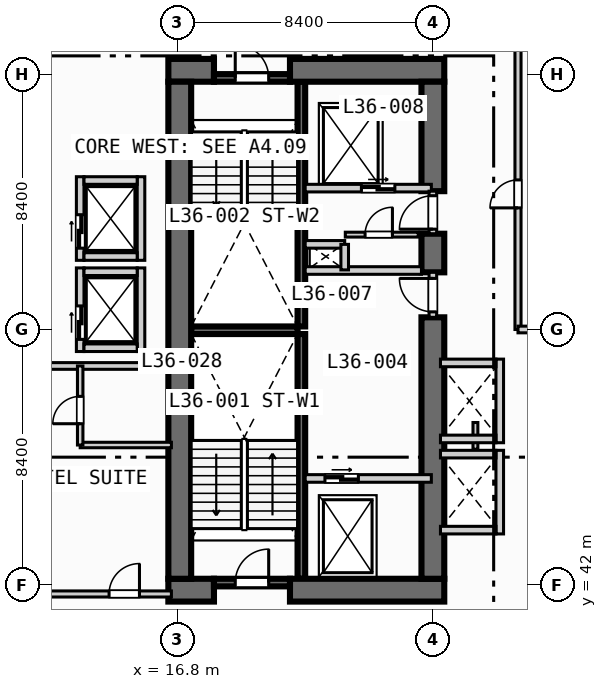
"""IFC4 building model, lengths in metres.
Left out: names, types, materials, properties, quantities, classifications, styles, units other than length and angle.
Written with IfcOpenShell. Run it as: python <this file> out.ifc"""

import sys

from ifc_helpers import new_model, si_unit, direction, frame, frame_2d, origin, place, context, subcontext, project, spatial, rectangle, extrude, element, fill, save


model = new_model("IFC4")
c1 = context("Model", 3, precision=1e-05, world=origin(), true_north=direction((0.0, 1.0)))
c2 = subcontext(c1, "Body", "Model", "MODEL_VIEW")
j1 = project(units=[si_unit("LENGTHUNIT", "METRE"), si_unit("PLANEANGLEUNIT", "RADIAN")], contexts=[c1])
p1 = place(None, origin())
s1 = spatial("IfcSite", under=j1, at=p1, CompositionType="ELEMENT")
p2 = place(p1, origin())
s2 = spatial("IfcBuilding", under=s1, at=p2, CompositionType="ELEMENT")
p3 = place(p2, frame((0.0, 0.0, 149.4)))
s3 = spatial("IfcBuildingStorey", under=s2, at=p3, CompositionType="ELEMENT", Elevation=149.4)
for number, where, z_axis, x_axis in (
    (1, (20.875, 42.2, 0.0), (0.0, 0.0, 1.0), (0.0, 1.0, 0.0)),
    (2, (20.875, 50.5, 0.0), (0.0, 0.0, 1.0), (0.0, 1.0, 0.0)),
):
    element("IfcWall", number, at=place(p3, frame(where, z_axis=z_axis, x_axis=x_axis)), inside=s3, PredefinedType="SOLIDWALL", context=c2, shape_type="SweptSolid", body=[
        extrude(rectangle(XDim=8.05, YDim=0.25, at=frame_2d((4.025, 0.0))), origin(), (0.0, 0.0, 1.0), 3.55),
    ])
p4 = place(p3, frame((17.25, 50.375, 0.0), z_axis=(0.0, 0.0, 1.0), x_axis=(1.0, 0.0, 0.0)))
e3 = element("IfcWall", 3, at=p4, inside=s3, PredefinedType="SOLIDWALL", context=c2, shape_type="SweptSolid", body=[
    extrude(rectangle(XDim=3.5, YDim=0.25, at=frame_2d((1.75, 0.0))), origin(), (0.0, 0.0, 1.0), 3.55),
])
p5 = place(p3, frame((16.5, 41.825, 0.0), z_axis=(0.0, 0.0, 1.0), x_axis=(1.0, 0.0, 0.0)))
e4 = element("IfcWall", 4, at=p5, inside=s3, PredefinedType="SHEAR", context=c2, shape_type="SweptSolid", body=[
    extrude(rectangle(XDim=1.5, YDim=0.75, at=frame_2d((0.75, 0.0))), origin(), (0.0, 0.0, 1.0), 3.55),
])
p6 = place(p3, frame((20.5, 41.825, 0.0), z_axis=(0.0, 0.0, 1.0), x_axis=(1.0, 0.0, 0.0)))
e5 = element("IfcWall", 5, at=p6, inside=s3, PredefinedType="SHEAR", context=c2, shape_type="SweptSolid", body=[
    extrude(rectangle(XDim=5.075, YDim=0.75, at=frame_2d((2.538, 0.0))), origin(), (0.0, 0.0, 1.0), 3.55),
])
p7 = place(p3, frame((16.5, 58.925, 0.0), z_axis=(0.0, 0.0, 1.0), x_axis=(1.0, 0.0, 0.0)))
e6 = element("IfcWall", 6, at=p7, inside=s3, PredefinedType="SHEAR", context=c2, shape_type="SweptSolid", body=[
    extrude(rectangle(XDim=1.5, YDim=0.75, at=frame_2d((0.75, 0.0))), origin(), (0.0, 0.0, 1.0), 3.55),
])
p8 = place(p3, frame((20.5, 58.925, 0.0), z_axis=(0.0, 0.0, 1.0), x_axis=(1.0, 0.0, 0.0)))
e7 = element("IfcWall", 7, at=p8, inside=s3, PredefinedType="SHEAR", context=c2, shape_type="SweptSolid", body=[
    extrude(rectangle(XDim=5.075, YDim=0.75, at=frame_2d((2.538, 0.0))), origin(), (0.0, 0.0, 1.0), 3.55),
])
p9 = place(p3, frame((16.875, 42.2, 0.0), z_axis=(0.0, 0.0, 1.0), x_axis=(0.0, 1.0, 0.0)))
e8 = element("IfcWall", 8, at=p9, inside=s3, PredefinedType="SHEAR", context=c2, shape_type="SweptSolid", body=[
    extrude(rectangle(XDim=16.35, YDim=0.75, at=frame_2d((8.175, 0.0))), origin(), (0.0, 0.0, 1.0), 3.55),
])
p10 = place(p3, frame((25.2, 42.2, 0.0), z_axis=(0.0, 0.0, 1.0), x_axis=(0.0, 1.0, 0.0)))
e9 = element("IfcWall", 9, at=p10, inside=s3, PredefinedType="SHEAR", context=c2, shape_type="SweptSolid", body=[
    extrude(rectangle(XDim=8.6, YDim=0.75, at=frame_2d((4.3, 0.0))), origin(), (0.0, 0.0, 1.0), 3.55),
])
p11 = place(p3, frame((25.2, 52.28, 0.0), z_axis=(0.0, 0.0, 1.0), x_axis=(0.0, 1.0, 0.0)))
e10 = element("IfcWall", 10, at=p11, inside=s3, PredefinedType="SHEAR", context=c2, shape_type="SweptSolid", body=[
    extrude(rectangle(XDim=1.27, YDim=0.75, at=frame_2d((0.635, 0.0))), origin(), (0.0, 0.0, 1.0), 3.55),
])
p12 = place(p3, frame((25.2, 54.95, 0.0), z_axis=(0.0, 0.0, 1.0), x_axis=(0.0, 1.0, 0.0)))
e11 = element("IfcWall", 11, at=p12, inside=s3, PredefinedType="SHEAR", context=c2, shape_type="SweptSolid", body=[
    extrude(rectangle(XDim=3.6, YDim=0.75, at=frame_2d((1.8, 0.0))), origin(), (0.0, 0.0, 1.0), 3.55),
])
p13 = place(p3, frame((18.0, 42.075, 0.0), z_axis=(0.0, 0.0, 1.0), x_axis=(1.0, 0.0, 0.0)))
e12 = element("IfcWall", 12, at=p13, inside=s3, PredefinedType="SOLIDWALL", context=c2, shape_type="SweptSolid", body=[
    extrude(rectangle(XDim=2.5, YDim=0.25, at=frame_2d((1.25, 0.0))), origin(), (0.0, 0.0, 1.0), 3.55),
])
p14 = place(p13, frame((0.7, 0.0, 0.0)))
e13 = element("IfcOpeningElement", 13, at=p14, cuts=e12, PredefinedType="OPENING", context=c2, shape_type="SweptSolid", body=[
    extrude(rectangle(XDim=1.1, YDim=2.15, at=frame_2d((0.55, 1.075))), frame((0.0, 0.135, 0.0), z_axis=(0.0, -1.0, 0.0), x_axis=(1.0, 0.0, 0.0)), (0.0, 0.0, 1.0), 0.27),
])
p15 = place(p3, frame((18.0, 58.675, 0.0), z_axis=(0.0, 0.0, 1.0), x_axis=(1.0, 0.0, 0.0)))
e14 = element("IfcWall", 14, at=p15, inside=s3, PredefinedType="SOLIDWALL", context=c2, shape_type="SweptSolid", body=[
    extrude(rectangle(XDim=2.5, YDim=0.25, at=frame_2d((1.25, 0.0))), origin(), (0.0, 0.0, 1.0), 3.55),
])
p16 = place(p15, frame((0.7, 0.0, 0.0)))
e15 = element("IfcOpeningElement", 15, at=p16, cuts=e14, PredefinedType="OPENING", context=c2, shape_type="SweptSolid", body=[
    extrude(rectangle(XDim=1.1, YDim=2.15, at=frame_2d((0.55, 1.075))), frame((0.0, 0.135, 0.0), z_axis=(0.0, -1.0, 0.0), x_axis=(1.0, 0.0, 0.0)), (0.0, 0.0, 1.0), 0.27),
])
p17 = place(p3, frame((21.0, 45.5, 0.0), z_axis=(0.0, 0.0, 1.0), x_axis=(1.0, 0.0, 0.0)))
e16 = element("IfcWall", 16, at=p17, inside=s3, PredefinedType="SOLIDWALL", context=c2, shape_type="SweptSolid", body=[
    extrude(rectangle(XDim=4.15, YDim=0.25, at=frame_2d((2.075, 0.0))), origin(), (0.0, 0.0, 1.0), 3.55),
])
p18 = place(p17, frame((0.65, 0.0, 0.0)))
e17 = element("IfcOpeningElement", 17, at=p18, cuts=e16, PredefinedType="OPENING", context=c2, shape_type="SweptSolid", body=[
    extrude(rectangle(XDim=1.1, YDim=2.15, at=frame_2d((0.55, 1.075))), frame((0.0, 0.135, 0.0), z_axis=(0.0, -1.0, 0.0), x_axis=(1.0, 0.0, 0.0)), (0.0, 0.0, 1.0), 0.27),
])
p19 = place(p3, frame((25.2, 50.8, 0.0), z_axis=(0.0, 0.0, 1.0), x_axis=(0.0, 1.0, 0.0)))
e18 = element("IfcWall", 18, at=p19, inside=s3, PredefinedType="SOLIDWALL", context=c2, shape_type="SweptSolid", body=[
    extrude(rectangle(XDim=1.48, YDim=0.25, at=frame_2d((0.74, 0.0))), origin(), (0.0, 0.0, 1.0), 3.55),
])
p20 = place(p19, frame((0.18, 0.0, 0.0)))
e19 = element("IfcOpeningElement", 19, at=p20, cuts=e18, PredefinedType="OPENING", context=c2, shape_type="SweptSolid", body=[
    extrude(rectangle(XDim=1.1, YDim=2.15, at=frame_2d((0.55, 1.075))), frame((0.0, 0.135, 0.0), z_axis=(0.0, -1.0, 0.0), x_axis=(1.0, 0.0, 0.0)), (0.0, 0.0, 1.0), 0.27),
])
p21 = place(p3, frame((21.0, 52.34, 0.0), z_axis=(0.0, 0.0, 1.0), x_axis=(1.0, 0.0, 0.0)))
e20 = element("IfcWall", 20, at=p21, inside=s3, PredefinedType="SOLIDWALL", context=c2, shape_type="SweptSolid", body=[
    extrude(rectangle(XDim=3.825, YDim=0.25, at=frame_2d((1.913, 0.0))), origin(), (0.0, 0.0, 1.0), 3.55),
])
p22 = place(p3, frame((21.0, 55.05, 0.0), z_axis=(0.0, 0.0, 1.0), x_axis=(1.0, 0.0, 0.0)))
e21 = element("IfcWall", 21, at=p22, inside=s3, PredefinedType="SOLIDWALL", context=c2, shape_type="SweptSolid", body=[
    extrude(rectangle(XDim=4.15, YDim=0.25, at=frame_2d((2.075, 0.0))), origin(), (0.0, 0.0, 1.0), 3.55),
])
p23 = place(p22, frame((1.85, 0.0, 0.0)))
e22 = element("IfcOpeningElement", 22, at=p23, cuts=e21, PredefinedType="OPENING", context=c2, shape_type="SweptSolid", body=[
    extrude(rectangle(XDim=1.1, YDim=2.15, at=frame_2d((0.55, 1.075))), frame((0.0, 0.135, 0.0), z_axis=(0.0, -1.0, 0.0), x_axis=(1.0, 0.0, 0.0)), (0.0, 0.0, 1.0), 0.27),
])
p24 = place(p3, frame((25.2, 53.55, 0.0), z_axis=(0.0, 0.0, 1.0), x_axis=(0.0, 1.0, 0.0)))
e23 = element("IfcWall", 23, at=p24, inside=s3, PredefinedType="SOLIDWALL", context=c2, shape_type="SweptSolid", body=[
    extrude(rectangle(XDim=1.4, YDim=0.25, at=frame_2d((0.7, 0.0))), origin(), (0.0, 0.0, 1.0), 3.55),
])
p25 = place(p24, frame((0.15, 0.0, 0.0)))
e24 = element("IfcOpeningElement", 24, at=p25, cuts=e23, PredefinedType="OPENING", context=c2, shape_type="SweptSolid", body=[
    extrude(rectangle(XDim=1.1, YDim=2.15, at=frame_2d((0.55, 1.075))), frame((0.0, 0.135, 0.0), z_axis=(0.0, -1.0, 0.0), x_axis=(1.0, 0.0, 0.0)), (0.0, 0.0, 1.0), 0.27),
])
p26 = place(p3, frame((21.0, 53.2, 0.0), z_axis=(0.0, 0.0, 1.0), x_axis=(1.0, 0.0, 0.0)))
e25 = element("IfcWall", 25, at=p26, inside=s3, PredefinedType="SOLIDWALL", context=c2, shape_type="SweptSolid", body=[
    extrude(rectangle(XDim=1.3, YDim=0.25, at=frame_2d((0.65, 0.0))), origin(), (0.0, 0.0, 1.0), 3.55),
])
p27 = place(p3, frame((22.3, 52.36, 0.0), z_axis=(0.0, 0.0, 1.0), x_axis=(0.0, 1.0, 0.0)))
e26 = element("IfcWall", 26, at=p27, inside=s3, PredefinedType="SOLIDWALL", context=c2, shape_type="SweptSolid", body=[
    extrude(rectangle(XDim=0.84, YDim=0.25, at=frame_2d((0.42, 0.0))), origin(), (0.0, 0.0, 1.0), 3.55),
])
p28 = place(p3, frame((22.32, 53.52, 0.0), z_axis=(0.0, 0.0, 1.0), x_axis=(1.0, 0.0, 0.0)))
e27 = element("IfcWall", 27, at=p28, inside=s3, PredefinedType="PARTITIONING", context=c2, shape_type="SweptSolid", body=[
    extrude(rectangle(XDim=2.4, YDim=0.16, at=frame_2d((1.2, 0.0))), origin(), (0.0, 0.0, 1.0), 3.55),
])
p29 = place(p28, frame((0.65, 0.0, 0.0)))
e28 = element("IfcOpeningElement", 28, at=p29, cuts=e27, PredefinedType="OPENING", context=c2, shape_type="SweptSolid", body=[
    extrude(rectangle(XDim=0.9, YDim=2.1, at=frame_2d((0.45, 1.05))), frame((0.0, 0.09, 0.0), z_axis=(0.0, -1.0, 0.0), x_axis=(1.0, 0.0, 0.0)), (0.0, 0.0, 1.0), 0.18),
])
p30 = place(p3, frame((13.6, 49.675, 0.0), z_axis=(0.0, 0.0, 1.0), x_axis=(0.0, 1.0, 0.0)))
e29 = element("IfcWall", 29, at=p30, inside=s3, PredefinedType="SOLIDWALL", context=c2, shape_type="SweptSolid", body=[
    extrude(rectangle(XDim=2.75, YDim=0.25, at=frame_2d((1.375, 0.0))), origin(), (0.0, 0.0, 1.0), 3.55),
])
p31 = place(p30, frame((0.4, 0.0, 0.0)))
e30 = element("IfcOpeningElement", 30, at=p31, cuts=e29, PredefinedType="OPENING", context=c2, shape_type="SweptSolid", body=[
    extrude(rectangle(XDim=1.1, YDim=2.15, at=frame_2d((0.55, 1.075))), frame((0.0, 0.135, 0.0), z_axis=(0.0, -1.0, 0.0), x_axis=(1.0, 0.0, 0.0)), (0.0, 0.0, 1.0), 0.27),
])
p32 = place(p3, frame((15.6, 49.675, 0.0), z_axis=(0.0, 0.0, 1.0), x_axis=(0.0, 1.0, 0.0)))
e31 = element("IfcWall", 31, at=p32, inside=s3, PredefinedType="SOLIDWALL", context=c2, shape_type="SweptSolid", body=[
    extrude(rectangle(XDim=2.75, YDim=0.25, at=frame_2d((1.375, 0.0))), origin(), (0.0, 0.0, 1.0), 3.55),
])
for number, where, z_axis, x_axis in (
    (32, (13.725, 49.8, 0.0), (0.0, 0.0, 1.0), (1.0, 0.0, 0.0)),
    (33, (13.725, 52.3, 0.0), (0.0, 0.0, 1.0), (1.0, 0.0, 0.0)),
):
    element("IfcWall", number, at=place(p3, frame(where, z_axis=z_axis, x_axis=x_axis)), inside=s3, PredefinedType="SOLIDWALL", context=c2, shape_type="SweptSolid", body=[
        extrude(rectangle(XDim=1.75, YDim=0.25, at=frame_2d((0.875, 0.0))), origin(), (0.0, 0.0, 1.0), 3.55),
    ])
p33 = place(p3, frame((13.6, 52.675, 0.0), z_axis=(0.0, 0.0, 1.0), x_axis=(0.0, 1.0, 0.0)))
e34 = element("IfcWall", 34, at=p33, inside=s3, PredefinedType="SOLIDWALL", context=c2, shape_type="SweptSolid", body=[
    extrude(rectangle(XDim=2.75, YDim=0.25, at=frame_2d((1.375, 0.0))), origin(), (0.0, 0.0, 1.0), 3.55),
])
p34 = place(p33, frame((0.4, 0.0, 0.0)))
e35 = element("IfcOpeningElement", 35, at=p34, cuts=e34, PredefinedType="OPENING", context=c2, shape_type="SweptSolid", body=[
    extrude(rectangle(XDim=1.1, YDim=2.15, at=frame_2d((0.55, 1.075))), frame((0.0, 0.135, 0.0), z_axis=(0.0, -1.0, 0.0), x_axis=(1.0, 0.0, 0.0)), (0.0, 0.0, 1.0), 0.27),
])
p35 = place(p3, frame((15.6, 52.675, 0.0), z_axis=(0.0, 0.0, 1.0), x_axis=(0.0, 1.0, 0.0)))
e36 = element("IfcWall", 36, at=p35, inside=s3, PredefinedType="SOLIDWALL", context=c2, shape_type="SweptSolid", body=[
    extrude(rectangle(XDim=2.75, YDim=0.25, at=frame_2d((1.375, 0.0))), origin(), (0.0, 0.0, 1.0), 3.55),
])
for number, where, z_axis, x_axis in (
    (37, (13.725, 52.8, 0.0), (0.0, 0.0, 1.0), (1.0, 0.0, 0.0)),
    (38, (13.725, 55.3, 0.0), (0.0, 0.0, 1.0), (1.0, 0.0, 0.0)),
):
    element("IfcWall", number, at=place(p3, frame(where, z_axis=z_axis, x_axis=x_axis)), inside=s3, PredefinedType="SOLIDWALL", context=c2, shape_type="SweptSolid", body=[
        extrude(rectangle(XDim=1.75, YDim=0.25, at=frame_2d((0.875, 0.0))), origin(), (0.0, 0.0, 1.0), 3.55),
    ])
p36 = place(p3, frame((27.4, 43.675, 0.0), z_axis=(0.0, 0.0, 1.0), x_axis=(0.0, 1.0, 0.0)))
e39 = element("IfcWall", 39, at=p36, inside=s3, PredefinedType="SOLIDWALL", context=c2, shape_type="SweptSolid", body=[
    extrude(rectangle(XDim=2.75, YDim=0.25, at=frame_2d((1.375, 0.0))), origin(), (0.0, 0.0, 1.0), 3.55),
])
for number, where, z_axis, x_axis in (
    (40, (25.45, 43.8, 0.0), (0.0, 0.0, 1.0), (1.0, 0.0, 0.0)),
    (41, (25.45, 46.3, 0.0), (0.0, 0.0, 1.0), (1.0, 0.0, 0.0)),
):
    element("IfcWall", number, at=place(p3, frame(where, z_axis=z_axis, x_axis=x_axis)), inside=s3, PredefinedType="SOLIDWALL", context=c2, shape_type="SweptSolid", body=[
        extrude(rectangle(XDim=1.825, YDim=0.25, at=frame_2d((0.913, 0.0))), origin(), (0.0, 0.0, 1.0), 3.55),
    ])
p37 = place(p3, frame((26.6, 46.46, 0.0), z_axis=(0.0, 0.0, 1.0), x_axis=(0.0, 1.0, 0.0)))
e42 = element("IfcWall", 42, at=p37, inside=s3, PredefinedType="PARTITIONING", context=c2, shape_type="SweptSolid", body=[
    extrude(rectangle(XDim=0.88, YDim=0.16, at=frame_2d((0.44, 0.0))), origin(), (0.0, 0.0, 1.0), 3.55),
])
p38 = place(p3, frame((27.4, 46.675, 0.0), z_axis=(0.0, 0.0, 1.0), x_axis=(0.0, 1.0, 0.0)))
e43 = element("IfcWall", 43, at=p38, inside=s3, PredefinedType="SOLIDWALL", context=c2, shape_type="SweptSolid", body=[
    extrude(rectangle(XDim=2.75, YDim=0.25, at=frame_2d((1.375, 0.0))), origin(), (0.0, 0.0, 1.0), 3.55),
])
for number, where, z_axis, x_axis in (
    (44, (25.45, 46.8, 0.0), (0.0, 0.0, 1.0), (1.0, 0.0, 0.0)),
    (45, (25.45, 49.3, 0.0), (0.0, 0.0, 1.0), (1.0, 0.0, 0.0)),
):
    element("IfcWall", number, at=place(p3, frame(where, z_axis=z_axis, x_axis=x_axis)), inside=s3, PredefinedType="SOLIDWALL", context=c2, shape_type="SweptSolid", body=[
        extrude(rectangle(XDim=1.825, YDim=0.25, at=frame_2d((0.913, 0.0))), origin(), (0.0, 0.0, 1.0), 3.55),
    ])
p39 = place(p3, frame((0.35, 41.7, 0.0), z_axis=(0.0, 0.0, 1.0), x_axis=(1.0, 0.0, 0.0)))
e46 = element("IfcWall", 46, at=p39, inside=s3, PredefinedType="PARTITIONING", context=c2, shape_type="SweptSolid", body=[
    extrude(rectangle(XDim=16.25, YDim=0.2, at=frame_2d((8.125, 0.0))), origin(), (0.0, 0.0, 1.0), 2.9),
])
p40 = place(p39, frame((14.2, 0.0, 0.0)))
e47 = element("IfcOpeningElement", 47, at=p40, cuts=e46, PredefinedType="OPENING", context=c2, shape_type="SweptSolid", body=[
    extrude(rectangle(XDim=1.0, YDim=2.15, at=frame_2d((0.5, 1.075))), frame((0.0, 0.11, 0.0), z_axis=(0.0, -1.0, 0.0), x_axis=(1.0, 0.0, 0.0)), (0.0, 0.0, 1.0), 0.22),
])
p41 = place(p3, frame((0.35, 49.2, 0.0), z_axis=(0.0, 0.0, 1.0), x_axis=(1.0, 0.0, 0.0)))
e48 = element("IfcWall", 48, at=p41, inside=s3, PredefinedType="PARTITIONING", context=c2, shape_type="SweptSolid", body=[
    extrude(rectangle(XDim=16.25, YDim=0.22, at=frame_2d((8.125, 0.0))), origin(), (0.0, 0.0, 1.0), 3.55),
])
p42 = place(p3, frame((13.6, 46.6, 0.0), z_axis=(0.0, 0.0, 1.0), x_axis=(1.0, 0.0, 0.0)))
e49 = element("IfcWall", 49, at=p42, inside=s3, PredefinedType="PLUMBINGWALL", context=c2, shape_type="SweptSolid", body=[
    extrude(rectangle(XDim=3.0, YDim=0.18, at=frame_2d((1.5, 0.0))), origin(), (0.0, 0.0, 1.0), 3.55),
])
p43 = place(p3, frame((13.6, 46.6, 0.0), z_axis=(0.0, 0.0, 1.0), x_axis=(0.0, 1.0, 0.0)))
e50 = element("IfcWall", 50, at=p43, inside=s3, PredefinedType="PLUMBINGWALL", context=c2, shape_type="SweptSolid", body=[
    extrude(rectangle(XDim=2.6, YDim=0.18, at=frame_2d((1.3, 0.0))), origin(), (0.0, 0.0, 1.0), 3.55),
])
p44 = place(p43, frame((0.7, 0.0, 0.0)))
e51 = element("IfcOpeningElement", 51, at=p44, cuts=e50, PredefinedType="OPENING", context=c2, shape_type="SweptSolid", body=[
    extrude(rectangle(XDim=0.9, YDim=2.1, at=frame_2d((0.45, 1.05))), frame((0.0, 0.1, 0.0), z_axis=(0.0, -1.0, 0.0), x_axis=(1.0, 0.0, 0.0)), (0.0, 0.0, 1.0), 0.2),
])
p45 = place(p3, frame((28.0, 50.4, 0.0), z_axis=(0.0, 0.0, 1.0), x_axis=(0.0, 1.0, 0.0)))
e52 = element("IfcWall", 52, at=p45, inside=s3, PredefinedType="PARTITIONING", context=c2, shape_type="SweptSolid", body=[
    extrude(rectangle(XDim=38.6, YDim=0.2, at=frame_2d((19.3, 0.0))), origin(), (0.0, 0.0, 1.0), 3.55),
])
p46 = place(p45, frame((4.0, 0.0, 0.0)))
e53 = element("IfcOpeningElement", 53, at=p46, cuts=e52, PredefinedType="OPENING", context=c2, shape_type="SweptSolid", body=[
    extrude(rectangle(XDim=0.92, YDim=2.1, at=frame_2d((0.46, 1.05))), frame((0.0, 0.11, 0.0), z_axis=(0.0, -1.0, 0.0), x_axis=(1.0, 0.0, 0.0)), (0.0, 0.0, 1.0), 0.22),
])
p47 = place(p3, frame((28.0, 50.4, 0.0), z_axis=(0.0, 0.0, 1.0), x_axis=(1.0, 0.0, 0.0)))
e54 = element("IfcWall", 54, at=p47, inside=s3, PredefinedType="PARTITIONING", context=c2, shape_type="SweptSolid", body=[
    extrude(rectangle(XDim=5.3, YDim=0.22, at=frame_2d((2.65, 0.0))), origin(), (0.0, 0.0, 1.0), 3.187),
])
p48 = place(p14, origin())
e55 = element("IfcDoor", 55, at=p48, inside=s3, OperationType="SINGLE_SWING_RIGHT", PredefinedType="DOOR", context=c2, shape_type="SweptSolid", body=[
    extrude(rectangle(XDim=1.1, YDim=2.15, at=frame_2d((0.55, 1.075))), frame((0.0, 0.025, 0.0), z_axis=(0.0, -1.0, 0.0), x_axis=(1.0, 0.0, 0.0)), (0.0, 0.0, 1.0), 0.05),
])
fill(e13, e55)
p49 = place(p16, origin())
e56 = element("IfcDoor", 56, at=p49, inside=s3, OperationType="SINGLE_SWING_LEFT", PredefinedType="DOOR", context=c2, shape_type="SweptSolid", body=[
    extrude(rectangle(XDim=1.1, YDim=2.15, at=frame_2d((0.55, 1.075))), frame((0.0, 0.025, 0.0), z_axis=(0.0, -1.0, 0.0), x_axis=(1.0, 0.0, 0.0)), (0.0, 0.0, 1.0), 0.05),
])
fill(e15, e56)
p50 = place(p18, origin())
e57 = element("IfcDoor", 57, at=p50, inside=s3, OperationType="SLIDING_TO_LEFT", PredefinedType="DOOR", context=c2, shape_type="SweptSolid", body=[
    extrude(rectangle(XDim=1.1, YDim=2.15, at=frame_2d((0.55, 1.075))), frame((0.0, 0.025, 0.0), z_axis=(0.0, -1.0, 0.0), x_axis=(1.0, 0.0, 0.0)), (0.0, 0.0, 1.0), 0.05),
])
fill(e17, e57)
p51 = place(p20, origin())
e58 = element("IfcDoor", 58, at=p51, inside=s3, OperationType="SINGLE_SWING_RIGHT", PredefinedType="DOOR", context=c2, shape_type="SweptSolid", body=[
    extrude(rectangle(XDim=1.1, YDim=2.15, at=frame_2d((0.55, 1.075))), frame((0.0, 0.025, 0.0), z_axis=(0.0, -1.0, 0.0), x_axis=(1.0, 0.0, 0.0)), (0.0, 0.0, 1.0), 0.05),
])
fill(e19, e58)
p52 = place(p23, origin())
e59 = element("IfcDoor", 59, at=p52, inside=s3, OperationType="SLIDING_TO_LEFT", PredefinedType="DOOR", context=c2, shape_type="SweptSolid", body=[
    extrude(rectangle(XDim=1.1, YDim=2.15, at=frame_2d((0.55, 1.075))), frame((0.0, 0.025, 0.0), z_axis=(0.0, -1.0, 0.0), x_axis=(1.0, 0.0, 0.0)), (0.0, 0.0, 1.0), 0.05),
])
fill(e22, e59)
p53 = place(p25, origin())
e60 = element("IfcDoor", 60, at=p53, inside=s3, OperationType="SINGLE_SWING_LEFT", PredefinedType="DOOR", context=c2, shape_type="SweptSolid", body=[
    extrude(rectangle(XDim=1.1, YDim=2.15, at=frame_2d((0.55, 1.075))), frame((0.0, 0.025, 0.0), z_axis=(0.0, -1.0, 0.0), x_axis=(1.0, 0.0, 0.0)), (0.0, 0.0, 1.0), 0.05),
])
fill(e24, e60)
p54 = place(p29, origin())
e61 = element("IfcDoor", 61, at=p54, inside=s3, OperationType="SINGLE_SWING_RIGHT", PredefinedType="DOOR", context=c2, shape_type="SweptSolid", body=[
    extrude(rectangle(XDim=0.9, YDim=2.1, at=frame_2d((0.45, 1.05))), frame((0.0, 0.025, 0.0), z_axis=(0.0, -1.0, 0.0), x_axis=(1.0, 0.0, 0.0)), (0.0, 0.0, 1.0), 0.05),
])
fill(e28, e61)
p55 = place(p31, origin())
e62 = element("IfcDoor", 62, at=p55, inside=s3, OperationType="SLIDING_TO_LEFT", PredefinedType="DOOR", context=c2, shape_type="SweptSolid", body=[
    extrude(rectangle(XDim=1.1, YDim=2.15, at=frame_2d((0.55, 1.075))), frame((0.0, 0.025, 0.0), z_axis=(0.0, -1.0, 0.0), x_axis=(1.0, 0.0, 0.0)), (0.0, 0.0, 1.0), 0.05),
])
fill(e30, e62)
p56 = place(p34, origin())
e63 = element("IfcDoor", 63, at=p56, inside=s3, OperationType="SLIDING_TO_LEFT", PredefinedType="DOOR", context=c2, shape_type="SweptSolid", body=[
    extrude(rectangle(XDim=1.1, YDim=2.15, at=frame_2d((0.55, 1.075))), frame((0.0, 0.025, 0.0), z_axis=(0.0, -1.0, 0.0), x_axis=(1.0, 0.0, 0.0)), (0.0, 0.0, 1.0), 0.05),
])
fill(e35, e63)
p57 = place(p40, origin())
e64 = element("IfcDoor", 64, at=p57, inside=s3, OperationType="SINGLE_SWING_RIGHT", PredefinedType="DOOR", context=c2, shape_type="SweptSolid", body=[
    extrude(rectangle(XDim=1.0, YDim=2.15, at=frame_2d((0.5, 1.075))), frame((0.0, 0.025, 0.0), z_axis=(0.0, -1.0, 0.0), x_axis=(1.0, 0.0, 0.0)), (0.0, 0.0, 1.0), 0.05),
])
fill(e47, e64)
p58 = place(p44, origin())
e65 = element("IfcDoor", 65, at=p58, inside=s3, OperationType="SINGLE_SWING_LEFT", PredefinedType="DOOR", context=c2, shape_type="SweptSolid", body=[
    extrude(rectangle(XDim=0.9, YDim=2.1, at=frame_2d((0.45, 1.05))), frame((0.0, 0.025, 0.0), z_axis=(0.0, -1.0, 0.0), x_axis=(1.0, 0.0, 0.0)), (0.0, 0.0, 1.0), 0.05),
])
fill(e51, e65)
p59 = place(p46, origin())
e66 = element("IfcDoor", 66, at=p59, inside=s3, OperationType="SINGLE_SWING_LEFT", PredefinedType="DOOR", context=c2, shape_type="SweptSolid", body=[
    extrude(rectangle(XDim=0.92, YDim=2.1, at=frame_2d((0.46, 1.05))), frame((0.0, 0.025, 0.0), z_axis=(0.0, -1.0, 0.0), x_axis=(1.0, 0.0, 0.0)), (0.0, 0.0, 1.0), 0.05),
])
fill(e53, e66)
save(model, sys.argv[1])
